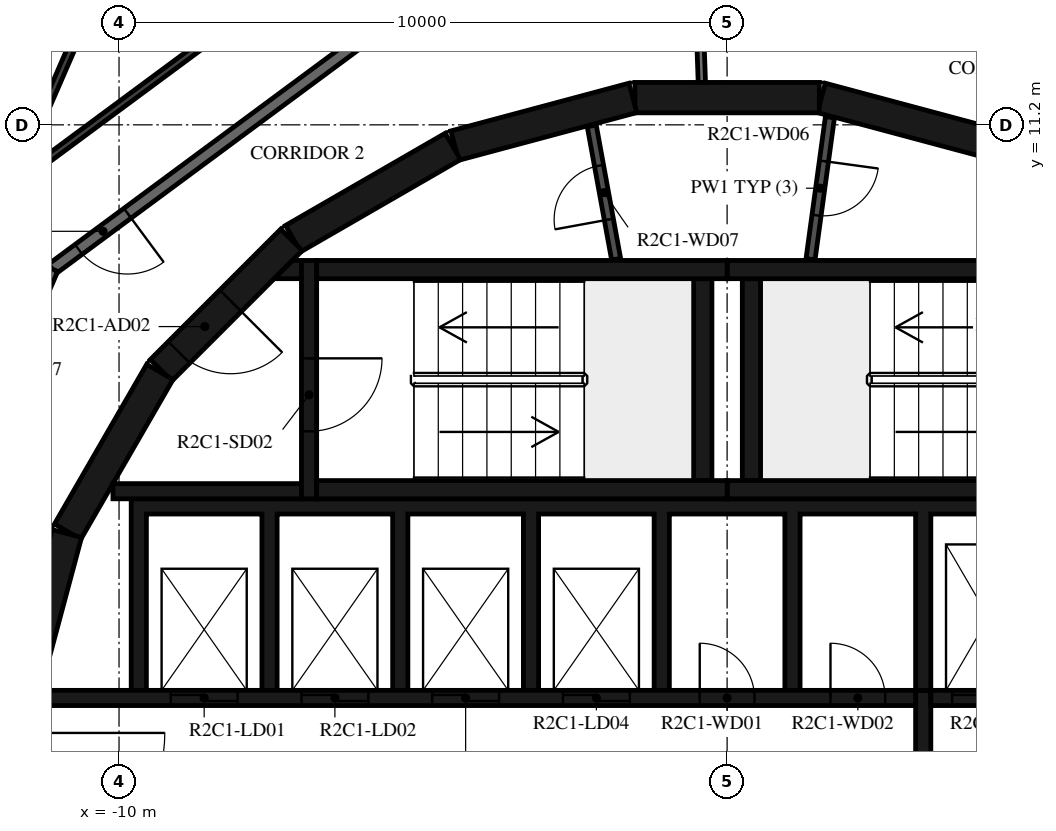
"""IFC4 building model, lengths in metres.
Left out: names, types, materials, properties, quantities, classifications, styles, units other than length and angle.
Written with IfcOpenShell. Run it as: python <this file> out.ifc"""

import sys

from ifc_helpers import new_model, si_unit, direction, frame, frame_2d, origin, place, context, subcontext, project, spatial, polyline, rectangle, outline, extrude, element, fill, save


model = new_model("IFC4")
c1 = context("Model", 3, precision=1e-05, world=origin(), true_north=direction((0.0, 1.0)))
c2 = subcontext(c1, "Body", "Model", "MODEL_VIEW")
j1 = project(units=[si_unit("LENGTHUNIT", "METRE"), si_unit("PLANEANGLEUNIT", "RADIAN")], contexts=[c1])
p1 = place(None, origin())
s1 = spatial("IfcSite", under=j1, at=p1, CompositionType="ELEMENT")
p2 = place(p1, origin())
s2 = spatial("IfcBuilding", under=s1, at=p2, CompositionType="ELEMENT")
p3 = place(p2, frame((0.0, 0.0, 101.2)))
s3 = spatial("IfcBuildingStorey", under=s2, at=p3, CompositionType="ELEMENT", Elevation=101.2)
for number, where, z_axis, x_axis in (
    (1, (4.479, 10.858, 0.0), (0.0, 0.0, 1.0), (-0.966, 0.259, 0.0)),
    (2, (1.516, 11.647, 0.0), (0.0, 0.0, 1.0), (-1.0, 0.0, 0.0)),
    (3, (-1.55, 11.643, 0.0), (0.0, 0.0, 1.0), (-0.966, -0.259, 0.0)),
    (4, (-4.51, 10.845, 0.0), (0.0, 0.0, 1.0), (-0.866, -0.5, 0.0)),
):
    element("IfcWall", number, at=place(p3, frame(where, z_axis=z_axis, x_axis=x_axis)), inside=s3, PredefinedType="SHEAR", context=c2, shape_type="SweptSolid", body=[
        extrude(rectangle(XDim=3.033, YDim=0.5, at=frame_2d((1.516, 0.0))), origin(), (0.0, 0.0, 1.0), 3.12),
    ])
p4 = place(p3, frame((-7.164, 9.308, 0.0), z_axis=(0.0, 0.0, 1.0), x_axis=(-0.707106781187, -0.707106781187, 0.0)))
e5 = element("IfcWall", 5, at=p4, inside=s3, PredefinedType="SHEAR", context=c2, shape_type="SweptSolid", body=[
    extrude(rectangle(XDim=3.032, YDim=0.5, at=frame_2d((1.516, 0.0))), origin(), (0.0, 0.0, 1.0), 3.12),
])
p5 = place(p4, frame((1.416, 0.0, 0.0)))
e6 = element("IfcOpeningElement", 6, at=p5, cuts=e5, PredefinedType="OPENING", context=c2, shape_type="SweptSolid", body=[
    extrude(rectangle(XDim=1.2, YDim=2.1, at=frame_2d((0.6, 1.05))), frame((0.0, 0.26, 0.0), z_axis=(0.0, -1.0, 0.0), x_axis=(1.0, 0.0, 0.0)), (0.0, 0.0, 1.0), 0.52),
])
for number, where, z_axis, x_axis in (
    (7, (-9.329, 7.137, 0.0), (0.0, 0.0, 1.0), (-0.5, -0.866, 0.0)),
    (8, (-10.858, 4.479, 0.0), (0.0, 0.0, 1.0), (-0.259, -0.966, 0.0)),
):
    element("IfcWall", number, at=place(p3, frame(where, z_axis=z_axis, x_axis=x_axis)), inside=s3, PredefinedType="SHEAR", context=c2, shape_type="SweptSolid", body=[
        extrude(rectangle(XDim=3.033, YDim=0.5, at=frame_2d((1.516, 0.0))), origin(), (0.0, 0.0, 1.0), 3.12),
    ])
for number, where, z_axis, x_axis in (
    (9, (0.0, 5.2, 0.0), (0.0, 0.0, 1.0), (1.0, 0.0, 0.0)),
    (10, (0.0, 8.82, 0.0), (0.0, 0.0, 1.0), (1.0, 0.0, 0.0)),
):
    element("IfcWall", number, at=place(p3, frame(where, z_axis=z_axis, x_axis=x_axis)), inside=s3, PredefinedType="SHEAR", context=c2, shape_type="SweptSolid", body=[
        extrude(rectangle(XDim=6.75, YDim=0.3, at=frame_2d((3.375, 0.0))), origin(), (0.0, 0.0, 1.0), 3.12),
    ])
p6 = place(p3, frame((0.4, 5.35, 0.0), z_axis=(0.0, 0.0, 1.0), x_axis=(0.0, 1.0, 0.0)))
e11 = element("IfcWall", 11, at=p6, inside=s3, PredefinedType="SHEAR", context=c2, shape_type="SweptSolid", body=[
    extrude(rectangle(XDim=3.32, YDim=0.3, at=frame_2d((1.66, 0.0))), origin(), (0.0, 0.0, 1.0), 3.12),
])
for number, where, z_axis, x_axis in (
    (12, (-6.75, 5.2, 0.0), (0.0, 0.0, 1.0), (1.0, 0.0, 0.0)),
    (13, (-6.75, 8.82, 0.0), (0.0, 0.0, 1.0), (1.0, 0.0, 0.0)),
):
    element("IfcWall", number, at=place(p3, frame(where, z_axis=z_axis, x_axis=x_axis)), inside=s3, PredefinedType="SHEAR", context=c2, shape_type="SweptSolid", body=[
        extrude(rectangle(XDim=6.75, YDim=0.3, at=frame_2d((3.375, 0.0))), origin(), (0.0, 0.0, 1.0), 3.12),
    ])
p7 = place(p3, frame((-0.4, 5.35, 0.0), z_axis=(0.0, 0.0, 1.0), x_axis=(0.0, 1.0, 0.0)))
e14 = element("IfcWall", 14, at=p7, inside=s3, PredefinedType="SHEAR", context=c2, shape_type="SweptSolid", body=[
    extrude(rectangle(XDim=3.32, YDim=0.3, at=frame_2d((1.66, 0.0))), origin(), (0.0, 0.0, 1.0), 3.12),
])
p8 = place(p3, frame((-6.875, 8.97, 0.0), z_axis=(0.0, 0.0, 1.0), x_axis=(0.0, -1.0, 0.0)))
e15 = element("IfcWall", 15, at=p8, inside=s3, PredefinedType="SHEAR", context=c2, shape_type="SweptSolid", body=[
    extrude(rectangle(XDim=3.92, YDim=0.25, at=frame_2d((1.96, 0.0))), origin(), (0.0, 0.0, 1.0), 3.12),
])
p9 = place(p8, frame((1.61, 0.0, 0.0)))
e16 = element("IfcOpeningElement", 16, at=p9, cuts=e15, PredefinedType="OPENING", context=c2, shape_type="SweptSolid", body=[
    extrude(rectangle(XDim=1.2, YDim=2.1, at=frame_2d((0.6, 1.05))), frame((0.0, 0.135, 0.0), z_axis=(0.0, -1.0, 0.0), x_axis=(1.0, 0.0, 0.0)), (0.0, 0.0, 1.0), 0.27),
])
p10 = place(p3, frame((-7.0, 5.175, 0.0), z_axis=(0.0, 0.0, 1.0), x_axis=(-1.0, 0.0, 0.0)))
e17 = element("IfcWall", 17, at=p10, inside=s3, PredefinedType="SHEAR", context=c2, shape_type="SweptSolid", body=[
    extrude(rectangle(XDim=3.1, YDim=0.25, at=frame_2d((1.55, 0.0))), origin(), (0.0, 0.0, 1.0), 3.12),
])
p11 = place(p3, origin())
e18 = element("IfcWall", 18, at=p11, inside=s3, PredefinedType="SHEAR", context=c2, shape_type="SweptSolid", body=[
    extrude(outline(polyline([(-7.148, 8.97), (-7.0, 8.97), (-7.0, 8.67), (-7.448, 8.67), (-7.148, 8.97)])), origin(), (0.0, 0.0, 1.0), 3.12),
])
p12 = place(p3, origin())
e19 = element("IfcWall", 19, at=p12, inside=s3, PredefinedType="SHEAR", context=c2, shape_type="SweptSolid", body=[
    extrude(outline(polyline([(-9.55, 4.8), (-7.65, 4.8), (-7.65, 1.9), (-7.4, 1.9), (-7.4, 4.8), (-5.5, 4.8), (-5.5, 1.9), (-5.25, 1.9), (-5.25, 4.8), (-3.35, 4.8), (-3.35, 1.9), (-3.1, 1.9), (-3.1, 4.8), (-1.2, 4.8), (-1.2, 1.9), (-0.95, 1.9), (-0.95, 4.8), (0.95, 4.8), (0.95, 1.9), (1.2, 1.9), (1.2, 4.8), (3.1, 4.8), (3.1, 1.9), (3.35, 1.9), (3.35, 4.8), (5.25, 4.8), (5.25, 1.9), (5.5, 1.9), (5.5, 4.8), (7.4, 4.8), (7.4, 1.9), (7.65, 1.9), (7.65, 4.8), (9.55, 4.8), (9.55, 1.9), (9.8, 1.9), (9.8, 4.8), (9.8, 5.05), (-9.8, 5.05), (-9.8, 4.8), (-9.8, 1.9), (-9.55, 1.9), (-9.55, 4.8)])), origin(), (0.0, 0.0, 1.0), 3.12),
])
p13 = place(p3, frame((-11.28, 1.775, 0.0), z_axis=(0.0, 0.0, 1.0), x_axis=(1.0, 0.0, 0.0)))
e20 = element("IfcWall", 20, at=p13, inside=s3, PredefinedType="SHEAR", context=c2, shape_type="SweptSolid", body=[
    extrude(rectangle(XDim=14.38, YDim=0.25, at=frame_2d((7.19, 0.0))), origin(), (0.0, 0.0, 1.0), 3.12),
])
p14 = place(p13, frame((2.13, 0.0, 0.0)))
e21 = element("IfcOpeningElement", 21, at=p14, cuts=e20, PredefinedType="OPENING", context=c2, shape_type="SweptSolid", body=[
    extrude(rectangle(XDim=1.1, YDim=2.1, at=frame_2d((0.55, 1.05))), frame((0.0, 0.135, 0.0), z_axis=(0.0, -1.0, 0.0), x_axis=(1.0, 0.0, 0.0)), (0.0, 0.0, 1.0), 0.27),
])
p15 = place(p13, frame((4.28, 0.0, 0.0)))
e22 = element("IfcOpeningElement", 22, at=p15, cuts=e20, PredefinedType="OPENING", context=c2, shape_type="SweptSolid", body=[
    extrude(rectangle(XDim=1.1, YDim=2.1, at=frame_2d((0.55, 1.05))), frame((0.0, 0.135, 0.0), z_axis=(0.0, -1.0, 0.0), x_axis=(1.0, 0.0, 0.0)), (0.0, 0.0, 1.0), 0.27),
])
p16 = place(p13, frame((6.43, 0.0, 0.0)))
e23 = element("IfcOpeningElement", 23, at=p16, cuts=e20, PredefinedType="OPENING", context=c2, shape_type="SweptSolid", body=[
    extrude(rectangle(XDim=1.1, YDim=2.1, at=frame_2d((0.55, 1.05))), frame((0.0, 0.135, 0.0), z_axis=(0.0, -1.0, 0.0), x_axis=(1.0, 0.0, 0.0)), (0.0, 0.0, 1.0), 0.27),
])
p17 = place(p13, frame((8.58, 0.0, 0.0)))
e24 = element("IfcOpeningElement", 24, at=p17, cuts=e20, PredefinedType="OPENING", context=c2, shape_type="SweptSolid", body=[
    extrude(rectangle(XDim=1.1, YDim=2.1, at=frame_2d((0.55, 1.05))), frame((0.0, 0.135, 0.0), z_axis=(0.0, -1.0, 0.0), x_axis=(1.0, 0.0, 0.0)), (0.0, 0.0, 1.0), 0.27),
])
p18 = place(p13, frame((10.83, 0.0, 0.0)))
e25 = element("IfcOpeningElement", 25, at=p18, cuts=e20, PredefinedType="OPENING", context=c2, shape_type="SweptSolid", body=[
    extrude(rectangle(XDim=0.9, YDim=2.1, at=frame_2d((0.45, 1.05))), frame((0.0, 0.135, 0.0), z_axis=(0.0, -1.0, 0.0), x_axis=(1.0, 0.0, 0.0)), (0.0, 0.0, 1.0), 0.27),
])
p19 = place(p13, frame((12.98, 0.0, 0.0)))
e26 = element("IfcOpeningElement", 26, at=p19, cuts=e20, PredefinedType="OPENING", context=c2, shape_type="SweptSolid", body=[
    extrude(rectangle(XDim=0.9, YDim=2.1, at=frame_2d((0.45, 1.05))), frame((0.0, 0.135, 0.0), z_axis=(0.0, -1.0, 0.0), x_axis=(1.0, 0.0, 0.0)), (0.0, 0.0, 1.0), 0.27),
])
p20 = place(p3, frame((3.35, 1.775, 0.0), z_axis=(0.0, 0.0, 1.0), x_axis=(1.0, 0.0, 0.0)))
e27 = element("IfcWall", 27, at=p20, inside=s3, PredefinedType="SHEAR", context=c2, shape_type="SweptSolid", body=[
    extrude(rectangle(XDim=7.93, YDim=0.25, at=frame_2d((3.965, 0.0))), origin(), (0.0, 0.0, 1.0), 3.12),
])
p21 = place(p20, frame((0.35, 0.0, 0.0)))
e28 = element("IfcOpeningElement", 28, at=p21, cuts=e27, PredefinedType="OPENING", context=c2, shape_type="SweptSolid", body=[
    extrude(rectangle(XDim=1.2, YDim=2.4, at=frame_2d((0.6, 1.2))), frame((0.0, 0.135, 0.0), z_axis=(0.0, -1.0, 0.0), x_axis=(1.0, 0.0, 0.0)), (0.0, 0.0, 1.0), 0.27),
])
p22 = place(p20, frame((2.5, 0.0, 0.0)))
e29 = element("IfcOpeningElement", 29, at=p22, cuts=e27, PredefinedType="OPENING", context=c2, shape_type="SweptSolid", body=[
    extrude(rectangle(XDim=1.2, YDim=2.4, at=frame_2d((0.6, 1.2))), frame((0.0, 0.135, 0.0), z_axis=(0.0, -1.0, 0.0), x_axis=(1.0, 0.0, 0.0)), (0.0, 0.0, 1.0), 0.27),
])
p23 = place(p20, frame((4.8, 0.0, 0.0)))
e30 = element("IfcOpeningElement", 30, at=p23, cuts=e27, PredefinedType="OPENING", context=c2, shape_type="SweptSolid", body=[
    extrude(rectangle(XDim=0.9, YDim=2.1, at=frame_2d((0.45, 1.05))), frame((0.0, 0.135, 0.0), z_axis=(0.0, -1.0, 0.0), x_axis=(1.0, 0.0, 0.0)), (0.0, 0.0, 1.0), 0.27),
])
p24 = place(p3, frame((3.225, -1.9, 0.0), z_axis=(0.0, 0.0, 1.0), x_axis=(0.0, 1.0, 0.0)))
e31 = element("IfcWall", 31, at=p24, inside=s3, PredefinedType="SHEAR", context=c2, shape_type="SweptSolid", body=[
    extrude(rectangle(XDim=3.8, YDim=0.25, at=frame_2d((1.9, 0.0))), origin(), (0.0, 0.0, 1.0), 3.12),
])
p25 = place(p3, frame((1.691, 11.326, 0.0), z_axis=(0.0, 0.0, 1.0), x_axis=(-0.135344253201, -0.990798633994, 0.0)))
e32 = element("IfcWall", 32, at=p25, inside=s3, PredefinedType="PARTITIONING", context=c2, shape_type="SweptSolid", body=[
    extrude(rectangle(XDim=2.358, YDim=0.15, at=frame_2d((1.179, 0.0))), origin(), (0.0, 0.0, 1.0), 3.12),
])
p26 = place(p25, frame((0.729, 0.0, 0.0)))
e33 = element("IfcOpeningElement", 33, at=p26, cuts=e32, PredefinedType="OPENING", context=c2, shape_type="SweptSolid", body=[
    extrude(rectangle(XDim=0.9, YDim=2.1, at=frame_2d((0.45, 1.05))), frame((0.0, 0.085, 0.0), z_axis=(0.0, -1.0, 0.0), x_axis=(1.0, 0.0, 0.0)), (0.0, 0.0, 1.0), 0.17),
])
p27 = place(p3, frame((-1.825, 8.99, 0.0), z_axis=(0.0, 0.0, 1.0), x_axis=(-0.179955206115, 0.983674805915, 0.0)))
e34 = element("IfcWall", 34, at=p27, inside=s3, PredefinedType="PARTITIONING", context=c2, shape_type="SweptSolid", body=[
    extrude(rectangle(XDim=2.229, YDim=0.15, at=frame_2d((1.115, 0.0))), origin(), (0.0, 0.0, 1.0), 3.12),
])
p28 = place(p27, frame((0.665, 0.0, 0.0)))
e35 = element("IfcOpeningElement", 35, at=p28, cuts=e34, PredefinedType="OPENING", context=c2, shape_type="SweptSolid", body=[
    extrude(rectangle(XDim=0.9, YDim=2.1, at=frame_2d((0.45, 1.05))), frame((0.0, 0.085, 0.0), z_axis=(0.0, -1.0, 0.0), x_axis=(1.0, 0.0, 0.0)), (0.0, 0.0, 1.0), 0.17),
])
p29 = place(p3, frame((-0.479, 13.734, 0.0), z_axis=(0.0, 0.0, 1.0), x_axis=(0.034805430832, -0.999394107439, 0.0)))
e36 = element("IfcWall", 36, at=p29, inside=s3, PredefinedType="PARTITIONING", context=c2, shape_type="SweptSolid", body=[
    extrude(rectangle(XDim=1.838, YDim=0.12, at=frame_2d((0.919, 0.0))), origin(), (0.0, 0.0, 1.0), 3.12),
])
p30 = place(p29, frame((0.115, 0.0, 0.0)))
e37 = element("IfcOpeningElement", 37, at=p30, cuts=e36, PredefinedType="OPENING", context=c2, shape_type="SweptSolid", body=[
    extrude(rectangle(XDim=1.2, YDim=2.1, at=frame_2d((0.6, 1.05))), frame((0.0, 0.07, 0.0), z_axis=(0.0, -1.0, 0.0), x_axis=(1.0, 0.0, 0.0)), (0.0, 0.0, 1.0), 0.14),
])
p31 = place(p3, frame((8.736, 11.141, 0.0), z_axis=(0.0, 0.0, 1.0), x_axis=(-0.917051290697, 0.398769269416, 0.0)))
e38 = element("IfcWall", 38, at=p31, inside=s3, PredefinedType="STANDARD", context=c2, shape_type="SweptSolid", body=[
    extrude(rectangle(XDim=7.24, YDim=0.2, at=frame_2d((3.62, 0.0))), origin(), (0.0, 0.0, 1.0), 3.12),
])
p32 = place(p31, frame((0.2, 0.0, 0.0)))
e39 = element("IfcOpeningElement", 39, at=p32, cuts=e38, PredefinedType="OPENING", context=c2, shape_type="SweptSolid", body=[
    extrude(rectangle(XDim=1.0, YDim=2.1, at=frame_2d((0.5, 1.05))), frame((0.0, 0.11, 0.0), z_axis=(0.0, -1.0, 0.0), x_axis=(1.0, 0.0, 0.0)), (0.0, 0.0, 1.0), 0.22),
])
p33 = place(p3, frame((-5.198, 13.196, 0.0), z_axis=(0.0, 0.0, 1.0), x_axis=(-0.803869883159, -0.594805187394, 0.0)))
e40 = element("IfcWall", 40, at=p33, inside=s3, PredefinedType="STANDARD", context=c2, shape_type="SweptSolid", body=[
    extrude(rectangle(XDim=7.342, YDim=0.2, at=frame_2d((3.671, 0.0))), origin(), (0.0, 0.0, 1.0), 3.12),
])
p34 = place(p33, frame((5.8, 0.0, 0.0)))
e41 = element("IfcOpeningElement", 41, at=p34, cuts=e40, PredefinedType="OPENING", context=c2, shape_type="SweptSolid", body=[
    extrude(rectangle(XDim=1.0, YDim=2.1, at=frame_2d((0.5, 1.05))), frame((0.0, 0.11, 0.0), z_axis=(0.0, -1.0, 0.0), x_axis=(1.0, 0.0, 0.0)), (0.0, 0.0, 1.0), 0.22),
])
p35 = place(p3, frame((-11.1, 8.829, 0.0), z_axis=(0.0, 0.0, 1.0), x_axis=(-0.398741918631, -0.917063183388, 0.0)))
e42 = element("IfcWall", 42, at=p35, inside=s3, PredefinedType="STANDARD", context=c2, shape_type="SweptSolid", body=[
    extrude(rectangle(XDim=7.342, YDim=0.2, at=frame_2d((3.671, 0.0))), origin(), (0.0, 0.0, 1.0), 3.12),
])
p36 = place(p3, frame((9.796, 12.315, 0.0), z_axis=(0.0, 0.0, 1.0), x_axis=(-0.917059572812, 0.398750222463, 0.0)))
e43 = element("IfcWall", 43, at=p36, inside=s3, PredefinedType="PARTITIONING", context=c2, shape_type="SweptSolid", body=[
    extrude(rectangle(XDim=8.146, YDim=0.12, at=frame_2d((4.073, 0.0))), origin(), (0.0, 0.0, 1.0), 3.12),
])
p37 = place(p36, frame((2.185, 0.0, 0.0)))
e44 = element("IfcOpeningElement", 44, at=p37, cuts=e43, PredefinedType="OPENING", context=c2, shape_type="SweptSolid", body=[
    extrude(rectangle(XDim=0.8, YDim=2.1, at=frame_2d((0.4, 1.05))), frame((0.0, 0.07, 0.0), z_axis=(0.0, -1.0, 0.0), x_axis=(1.0, 0.0, 0.0)), (0.0, 0.0, 1.0), 0.14),
])
p38 = place(p3, frame((-5.767, 14.641, 0.0), z_axis=(0.0, 0.0, 1.0), x_axis=(-0.803853364238, -0.594827511807, 0.0)))
e45 = element("IfcWall", 45, at=p38, inside=s3, PredefinedType="PARTITIONING", context=c2, shape_type="SweptSolid", body=[
    extrude(rectangle(XDim=8.146, YDim=0.12, at=frame_2d((4.073, 0.0))), origin(), (0.0, 0.0, 1.0), 3.12),
])
p39 = place(p38, frame((1.592, 0.0, 0.0)))
e46 = element("IfcOpeningElement", 46, at=p39, cuts=e45, PredefinedType="OPENING", context=c2, shape_type="SweptSolid", body=[
    extrude(rectangle(XDim=0.8, YDim=2.1, at=frame_2d((0.4, 1.05))), frame((0.0, 0.07, 0.0), z_axis=(0.0, -1.0, 0.0), x_axis=(1.0, 0.0, 0.0)), (0.0, 0.0, 1.0), 0.14),
])
p40 = place(p3, frame((-5.952, 23.571, 0.0), z_axis=(0.0, 0.0, 1.0), x_axis=(-0.398745097158, -0.917061801348, 0.0)))
e47 = element("IfcWall", 47, at=p40, inside=s3, PredefinedType="PARTITIONING", context=c2, shape_type="SweptSolid", body=[
    extrude(rectangle(XDim=14.576, YDim=0.12, at=frame_2d((7.288, 0.0))), origin(), (0.0, 0.0, 1.0), 3.12),
])
p41 = place(p40, frame((3.878, 0.0, 0.0)))
e48 = element("IfcOpeningElement", 48, at=p41, cuts=e47, PredefinedType="OPENING", context=c2, shape_type="SweptSolid", body=[
    extrude(rectangle(XDim=0.9, YDim=2.1, at=frame_2d((0.45, 1.05))), frame((0.0, 0.07, 0.0), z_axis=(0.0, -1.0, 0.0), x_axis=(1.0, 0.0, 0.0)), (0.0, 0.0, 1.0), 0.14),
])
p42 = place(p40, frame((0.2, 0.0, 0.0)))
e49 = element("IfcOpeningElement", 49, at=p42, cuts=e47, PredefinedType="OPENING", context=c2, shape_type="SweptSolid", body=[
    extrude(rectangle(XDim=0.9, YDim=2.1, at=frame_2d((0.45, 1.05))), frame((0.0, 0.07, 0.0), z_axis=(0.0, -1.0, 0.0), x_axis=(1.0, 0.0, 0.0)), (0.0, 0.0, 1.0), 0.14),
])
p43 = place(p9, origin())
e50 = element("IfcDoor", 50, at=p43, inside=s3, OperationType="SINGLE_SWING_LEFT", PredefinedType="DOOR", context=c2, shape_type="SweptSolid", body=[
    extrude(rectangle(XDim=1.2, YDim=2.1, at=frame_2d((0.6, 1.05))), frame((0.0, 0.025, 0.0), z_axis=(0.0, -1.0, 0.0), x_axis=(1.0, 0.0, 0.0)), (0.0, 0.0, 1.0), 0.05),
])
fill(e16, e50)
p44 = place(p5, origin())
e51 = element("IfcDoor", 51, at=p44, inside=s3, OperationType="SINGLE_SWING_RIGHT", PredefinedType="DOOR", context=c2, shape_type="SweptSolid", body=[
    extrude(rectangle(XDim=1.2, YDim=2.1, at=frame_2d((0.6, 1.05))), frame((0.0, 0.025, 0.0), z_axis=(0.0, -1.0, 0.0), x_axis=(1.0, 0.0, 0.0)), (0.0, 0.0, 1.0), 0.05),
])
fill(e6, e51)
p45 = place(p14, origin())
e52 = element("IfcDoor", 52, at=p45, inside=s3, OperationType="DOUBLE_DOOR_SLIDING", PredefinedType="DOOR", context=c2, shape_type="SweptSolid", body=[
    extrude(rectangle(XDim=1.1, YDim=2.1, at=frame_2d((0.55, 1.05))), frame((0.0, 0.025, 0.0), z_axis=(0.0, -1.0, 0.0), x_axis=(1.0, 0.0, 0.0)), (0.0, 0.0, 1.0), 0.05),
])
fill(e21, e52)
p46 = place(p15, origin())
e53 = element("IfcDoor", 53, at=p46, inside=s3, OperationType="DOUBLE_DOOR_SLIDING", PredefinedType="DOOR", context=c2, shape_type="SweptSolid", body=[
    extrude(rectangle(XDim=1.1, YDim=2.1, at=frame_2d((0.55, 1.05))), frame((0.0, 0.025, 0.0), z_axis=(0.0, -1.0, 0.0), x_axis=(1.0, 0.0, 0.0)), (0.0, 0.0, 1.0), 0.05),
])
fill(e22, e53)
p47 = place(p16, origin())
e54 = element("IfcDoor", 54, at=p47, inside=s3, OperationType="DOUBLE_DOOR_SLIDING", PredefinedType="DOOR", context=c2, shape_type="SweptSolid", body=[
    extrude(rectangle(XDim=1.1, YDim=2.1, at=frame_2d((0.55, 1.05))), frame((0.0, 0.025, 0.0), z_axis=(0.0, -1.0, 0.0), x_axis=(1.0, 0.0, 0.0)), (0.0, 0.0, 1.0), 0.05),
])
fill(e23, e54)
p48 = place(p17, origin())
e55 = element("IfcDoor", 55, at=p48, inside=s3, OperationType="DOUBLE_DOOR_SLIDING", PredefinedType="DOOR", context=c2, shape_type="SweptSolid", body=[
    extrude(rectangle(XDim=1.1, YDim=2.1, at=frame_2d((0.55, 1.05))), frame((0.0, 0.025, 0.0), z_axis=(0.0, -1.0, 0.0), x_axis=(1.0, 0.0, 0.0)), (0.0, 0.0, 1.0), 0.05),
])
fill(e24, e55)
p49 = place(p21, origin())
e56 = element("IfcDoor", 56, at=p49, inside=s3, OperationType="DOUBLE_DOOR_SLIDING", PredefinedType="DOOR", context=c2, shape_type="SweptSolid", body=[
    extrude(rectangle(XDim=1.2, YDim=2.4, at=frame_2d((0.6, 1.2))), frame((0.0, 0.025, 0.0), z_axis=(0.0, -1.0, 0.0), x_axis=(1.0, 0.0, 0.0)), (0.0, 0.0, 1.0), 0.05),
])
fill(e28, e56)
p50 = place(p18, origin())
e57 = element("IfcDoor", 57, at=p50, inside=s3, OperationType="SINGLE_SWING_RIGHT", PredefinedType="DOOR", context=c2, shape_type="SweptSolid", body=[
    extrude(rectangle(XDim=0.9, YDim=2.1, at=frame_2d((0.45, 1.05))), frame((0.0, 0.025, 0.0), z_axis=(0.0, -1.0, 0.0), x_axis=(1.0, 0.0, 0.0)), (0.0, 0.0, 1.0), 0.05),
])
fill(e25, e57)
p51 = place(p19, origin())
e58 = element("IfcDoor", 58, at=p51, inside=s3, OperationType="SINGLE_SWING_LEFT", PredefinedType="DOOR", context=c2, shape_type="SweptSolid", body=[
    extrude(rectangle(XDim=0.9, YDim=2.1, at=frame_2d((0.45, 1.05))), frame((0.0, 0.025, 0.0), z_axis=(0.0, -1.0, 0.0), x_axis=(1.0, 0.0, 0.0)), (0.0, 0.0, 1.0), 0.05),
])
fill(e26, e58)
p52 = place(p26, origin())
e59 = element("IfcDoor", 59, at=p52, inside=s3, OperationType="SINGLE_SWING_LEFT", PredefinedType="DOOR", context=c2, shape_type="SweptSolid", body=[
    extrude(rectangle(XDim=0.9, YDim=2.1, at=frame_2d((0.45, 1.05))), frame((0.0, 0.025, 0.0), z_axis=(0.0, -1.0, 0.0), x_axis=(1.0, 0.0, 0.0)), (0.0, 0.0, 1.0), 0.05),
])
fill(e33, e59)
p53 = place(p28, origin())
e60 = element("IfcDoor", 60, at=p53, inside=s3, OperationType="SINGLE_SWING_RIGHT", PredefinedType="DOOR", context=c2, shape_type="SweptSolid", body=[
    extrude(rectangle(XDim=0.9, YDim=2.1, at=frame_2d((0.45, 1.05))), frame((0.0, 0.025, 0.0), z_axis=(0.0, -1.0, 0.0), x_axis=(1.0, 0.0, 0.0)), (0.0, 0.0, 1.0), 0.05),
])
fill(e35, e60)
p54 = place(p34, origin())
e61 = element("IfcDoor", 61, at=p54, inside=s3, OperationType="SINGLE_SWING_LEFT", PredefinedType="DOOR", context=c2, shape_type="SweptSolid", body=[
    extrude(rectangle(XDim=1.0, YDim=2.1, at=frame_2d((0.5, 1.05))), frame((0.0, 0.025, 0.0), z_axis=(0.0, -1.0, 0.0), x_axis=(1.0, 0.0, 0.0)), (0.0, 0.0, 1.0), 0.05),
])
fill(e41, e61)
save(model, sys.argv[1])
